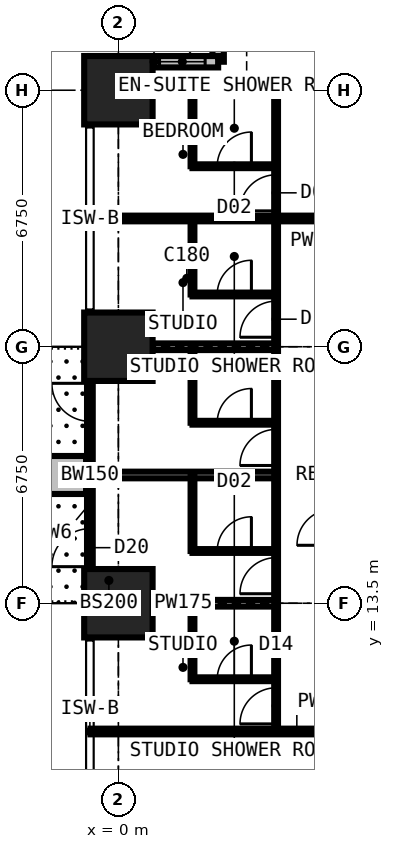
"""IFC4 building model, lengths in metres.
Left out: names, types, materials, properties, quantities, classifications, styles, units other than length and angle.
Written with IfcOpenShell. Run it as: python <this file> out.ifc"""

import sys

from ifc_helpers import new_model, si_unit, direction, frame, frame_2d, origin, origin_2d, place, context, subcontext, project, spatial, rectangle, extrude, element, fill, save


model = new_model("IFC4")
c1 = context("Model", 3, precision=1e-05, world=origin(), true_north=direction((0.0, 1.0)))
c2 = subcontext(c1, "Body", "Model", "MODEL_VIEW")
j1 = project(units=[si_unit("LENGTHUNIT", "METRE"), si_unit("PLANEANGLEUNIT", "RADIAN")], contexts=[c1])
p1 = place(None, origin())
s1 = spatial("IfcSite", under=j1, at=p1, CompositionType="ELEMENT")
p2 = place(p1, origin())
s2 = spatial("IfcBuilding", under=s1, at=p2, CompositionType="ELEMENT")
p3 = place(p2, frame((0.0, 0.0, 94.5)))
s3 = spatial("IfcBuildingStorey", under=s2, at=p3, CompositionType="ELEMENT", Elevation=94.5)
for number, where, z_axis, x_axis in (
    (1, (0.0, 13.5, 0.0), (0.0, 0.0, 1.0), (1.0, 0.0, 0.0)),
    (2, (0.0, 20.25, 0.0), (0.0, 0.0, 1.0), (1.0, 0.0, 0.0)),
    (3, (0.0, 27.0, 0.0), (0.0, 0.0, 1.0), (1.0, 0.0, 0.0)),
):
    element("IfcColumn", number, at=place(p3, frame(where, z_axis=z_axis, x_axis=x_axis)), inside=s3, PredefinedType="COLUMN", context=c2, shape_type="SweptSolid", body=[
        extrude(rectangle(XDim=1.8, YDim=1.8, at=origin_2d()), origin(), (0.0, 0.0, 1.0), 3.6),
    ])
p4 = place(p3, frame((2.625, 31.125, 0.0), z_axis=(0.0, 0.0, 1.0), x_axis=(0.0, -1.0, 0.0)))
e4 = element("IfcWall", 4, at=p4, inside=s3, PredefinedType="SOLIDWALL", context=c2, shape_type="SweptSolid", body=[
    extrude(rectangle(XDim=3.375, YDim=0.3, at=frame_2d((1.688, 0.0))), origin(), (0.0, 0.0, 1.0), 3.375),
])
p5 = place(p4, frame((0.788, 0.0, 0.6)))
e5 = element("IfcOpeningElement", 5, at=p5, cuts=e4, PredefinedType="OPENING", context=c2, shape_type="SweptSolid", body=[
    extrude(rectangle(XDim=1.8, YDim=2.1, at=frame_2d((0.9, 1.05))), frame((0.0, 0.16, 0.0), z_axis=(0.0, -1.0, 0.0), x_axis=(1.0, 0.0, 0.0)), (0.0, 0.0, 1.0), 0.32),
])
p6 = place(p3, frame((2.625, 27.75, 0.0), z_axis=(0.0, 0.0, 1.0), x_axis=(-1.0, 0.0, 0.0)))
e6 = element("IfcWall", 6, at=p6, inside=s3, PredefinedType="SOLIDWALL", context=c2, shape_type="SweptSolid", body=[
    extrude(rectangle(XDim=3.375, YDim=0.3, at=frame_2d((1.688, 0.0))), origin(), (0.0, 0.0, 1.0), 3.375),
])
p7 = place(p6, frame((0.343, 0.0, 0.9)))
e7 = element("IfcOpeningElement", 7, at=p7, cuts=e6, PredefinedType="OPENING", context=c2, shape_type="SweptSolid", body=[
    extrude(rectangle(XDim=1.2, YDim=1.8, at=frame_2d((0.6, 0.9))), frame((0.0, 0.16, 0.0), z_axis=(0.0, -1.0, 0.0), x_axis=(1.0, 0.0, 0.0)), (0.0, 0.0, 1.0), 0.32),
])
p8 = place(p3, frame((-0.75, 13.5, 0.0), z_axis=(0.0, 0.0, 1.0), x_axis=(0.0, 1.0, 0.0)))
e8 = element("IfcWall", 8, at=p8, inside=s3, PredefinedType="SOLIDWALL", context=c2, shape_type="SweptSolid", body=[
    extrude(rectangle(XDim=6.75, YDim=0.15, at=frame_2d((3.375, 0.0))), origin(), (0.0, 0.0, 1.0), 3.375),
])
p9 = place(p8, frame((0.962, 0.0, 0.0)))
e9 = element("IfcOpeningElement", 9, at=p9, cuts=e8, PredefinedType="OPENING", context=c2, shape_type="SweptSolid", body=[
    extrude(rectangle(XDim=1.0, YDim=2.2, at=frame_2d((0.5, 1.1))), frame((0.0, 0.085, 0.0), z_axis=(0.0, -1.0, 0.0), x_axis=(1.0, 0.0, 0.0)), (0.0, 0.0, 1.0), 0.17),
])
p10 = place(p8, frame((2.025, 0.0, 0.9)))
e10 = element("IfcOpeningElement", 10, at=p10, cuts=e8, PredefinedType="OPENING", context=c2, shape_type="SweptSolid", body=[
    extrude(rectangle(XDim=1.2, YDim=1.8, at=frame_2d((0.6, 0.9))), frame((0.0, 0.085, 0.0), z_axis=(0.0, -1.0, 0.0), x_axis=(1.0, 0.0, 0.0)), (0.0, 0.0, 1.0), 0.17),
])
p11 = place(p8, frame((4.788, 0.0, 0.0)))
e11 = element("IfcOpeningElement", 11, at=p11, cuts=e8, PredefinedType="OPENING", context=c2, shape_type="SweptSolid", body=[
    extrude(rectangle(XDim=1.0, YDim=2.2, at=frame_2d((0.5, 1.1))), frame((0.0, 0.085, 0.0), z_axis=(0.0, -1.0, 0.0), x_axis=(1.0, 0.0, 0.0)), (0.0, 0.0, 1.0), 0.17),
])
p12 = place(p8, frame((3.525, 0.0, 0.9)))
e12 = element("IfcOpeningElement", 12, at=p12, cuts=e8, PredefinedType="OPENING", context=c2, shape_type="SweptSolid", body=[
    extrude(rectangle(XDim=1.2, YDim=1.8, at=frame_2d((0.6, 0.9))), frame((0.0, 0.085, 0.0), z_axis=(0.0, -1.0, 0.0), x_axis=(1.0, 0.0, 0.0)), (0.0, 0.0, 1.0), 0.17),
])
p13 = place(p3, frame((-0.85, 16.875, 0.0), z_axis=(0.0, 0.0, 1.0), x_axis=(-1.0, 0.0, 0.0)))
e13 = element("IfcWall", 13, at=p13, inside=s3, PredefinedType="USERDEFINED", context=c2, shape_type="SweptSolid", body=[
    extrude(rectangle(XDim=2.2, YDim=1.0, at=frame_2d((1.1, 0.0))), origin(), (0.0, 0.0, 1.0), 0.9),
])
p14 = place(p3, frame((-0.734, 10.125, 0.0), z_axis=(0.0, 0.0, 1.0), x_axis=(1.0, 0.0, 0.0)))
e14 = element("IfcWall", 14, at=p14, inside=s3, PredefinedType="PARTITIONING", context=c2, shape_type="SweptSolid", body=[
    extrude(rectangle(XDim=10.859, YDim=0.15, at=frame_2d((5.429, 0.0))), origin(), (0.0, 0.0, 1.0), 3.375),
])
p15 = place(p3, frame((-0.734, 13.5, 0.0), z_axis=(0.0, 0.0, 1.0), x_axis=(1.0, 0.0, 0.0)))
e15 = element("IfcWall", 15, at=p15, inside=s3, PredefinedType="PARTITIONING", context=c2, shape_type="SweptSolid", body=[
    extrude(rectangle(XDim=4.884, YDim=0.175, at=frame_2d((2.442, 0.0))), origin(), (0.0, 0.0, 1.0), 2.877),
])
p16 = place(p3, frame((-0.734, 16.875, 0.0), z_axis=(0.0, 0.0, 1.0), x_axis=(1.0, 0.0, 0.0)))
e16 = element("IfcWall", 16, at=p16, inside=s3, PredefinedType="PARTITIONING", context=c2, shape_type="SweptSolid", body=[
    extrude(rectangle(XDim=4.884, YDim=0.175, at=frame_2d((2.442, 0.0))), origin(), (0.0, 0.0, 1.0), 3.375),
])
p17 = place(p3, frame((-0.734, 20.25, 0.0), z_axis=(0.0, 0.0, 1.0), x_axis=(1.0, 0.0, 0.0)))
e17 = element("IfcWall", 17, at=p17, inside=s3, PredefinedType="PARTITIONING", context=c2, shape_type="SweptSolid", body=[
    extrude(rectangle(XDim=4.884, YDim=0.175, at=frame_2d((2.442, 0.0))), origin(), (0.0, 0.0, 1.0), 2.877),
])
p18 = place(p3, frame((-0.734, 23.625, 0.0), z_axis=(0.0, 0.0, 1.0), x_axis=(1.0, 0.0, 0.0)))
e18 = element("IfcWall", 18, at=p18, inside=s3, PredefinedType="PARTITIONING", context=c2, shape_type="SweptSolid", body=[
    extrude(rectangle(XDim=12.034, YDim=0.15, at=frame_2d((6.017, 0.0))), origin(), (0.0, 0.0, 1.0), 3.375),
])
p19 = place(p3, frame((-0.734, 27.0, 0.0), z_axis=(0.0, 0.0, 1.0), x_axis=(1.0, 0.0, 0.0)))
e19 = element("IfcWall", 19, at=p19, inside=s3, PredefinedType="PARTITIONING", context=c2, shape_type="SweptSolid", body=[
    extrude(rectangle(XDim=12.034, YDim=0.15, at=frame_2d((6.017, 0.0))), origin(), (0.0, 0.0, 1.0), 2.806),
])
p20 = place(p19, frame((8.434, 0.0, 0.0)))
e20 = element("IfcOpeningElement", 20, at=p20, cuts=e19, PredefinedType="OPENING", context=c2, shape_type="SweptSolid", body=[
    extrude(rectangle(XDim=1.0, YDim=2.2, at=frame_2d((0.5, 1.1))), frame((0.0, 0.085, 0.0), z_axis=(0.0, -1.0, 0.0), x_axis=(1.0, 0.0, 0.0)), (0.0, 0.0, 1.0), 0.17),
])
p21 = place(p3, frame((1.95, 11.5, 0.0), z_axis=(0.0, 0.0, 1.0), x_axis=(0.0, 1.0, 0.0)))
e21 = element("IfcWall", 21, at=p21, inside=s3, PredefinedType="PARTITIONING", context=c2, shape_type="SweptSolid", body=[
    extrude(rectangle(XDim=2.0, YDim=0.1, at=frame_2d((1.0, 0.0))), origin(), (0.0, 0.0, 1.0), 3.375),
])
p22 = place(p3, frame((1.95, 11.5, 0.0), z_axis=(0.0, 0.0, 1.0), x_axis=(1.0, 0.0, 0.0)))
e22 = element("IfcWall", 22, at=p22, inside=s3, PredefinedType="PARTITIONING", context=c2, shape_type="SweptSolid", body=[
    extrude(rectangle(XDim=2.2, YDim=0.1, at=frame_2d((1.1, 0.0))), origin(), (0.0, 0.0, 1.0), 3.375),
])
p23 = place(p22, frame((0.65, 0.0, 0.0)))
e23 = element("IfcOpeningElement", 23, at=p23, cuts=e22, PredefinedType="OPENING", context=c2, shape_type="SweptSolid", body=[
    extrude(rectangle(XDim=0.9, YDim=2.2, at=frame_2d((0.45, 1.1))), frame((0.0, 0.06, 0.0), z_axis=(0.0, -1.0, 0.0), x_axis=(1.0, 0.0, 0.0)), (0.0, 0.0, 1.0), 0.12),
])
p24 = place(p3, frame((1.95, 14.875, 0.0), z_axis=(0.0, 0.0, 1.0), x_axis=(0.0, 1.0, 0.0)))
e24 = element("IfcWall", 24, at=p24, inside=s3, PredefinedType="PARTITIONING", context=c2, shape_type="SweptSolid", body=[
    extrude(rectangle(XDim=2.0, YDim=0.1, at=frame_2d((1.0, 0.0))), origin(), (0.0, 0.0, 1.0), 3.375),
])
p25 = place(p3, frame((1.95, 14.875, 0.0), z_axis=(0.0, 0.0, 1.0), x_axis=(1.0, 0.0, 0.0)))
e25 = element("IfcWall", 25, at=p25, inside=s3, PredefinedType="PARTITIONING", context=c2, shape_type="SweptSolid", body=[
    extrude(rectangle(XDim=2.2, YDim=0.1, at=frame_2d((1.1, 0.0))), origin(), (0.0, 0.0, 1.0), 3.375),
])
p26 = place(p25, frame((0.65, 0.0, 0.0)))
e26 = element("IfcOpeningElement", 26, at=p26, cuts=e25, PredefinedType="OPENING", context=c2, shape_type="SweptSolid", body=[
    extrude(rectangle(XDim=0.9, YDim=2.2, at=frame_2d((0.45, 1.1))), frame((0.0, 0.06, 0.0), z_axis=(0.0, -1.0, 0.0), x_axis=(1.0, 0.0, 0.0)), (0.0, 0.0, 1.0), 0.12),
])
p27 = place(p3, frame((1.95, 18.25, 0.0), z_axis=(0.0, 0.0, 1.0), x_axis=(0.0, 1.0, 0.0)))
e27 = element("IfcWall", 27, at=p27, inside=s3, PredefinedType="PARTITIONING", context=c2, shape_type="SweptSolid", body=[
    extrude(rectangle(XDim=2.0, YDim=0.1, at=frame_2d((1.0, 0.0))), origin(), (0.0, 0.0, 1.0), 3.375),
])
p28 = place(p3, frame((1.95, 18.25, 0.0), z_axis=(0.0, 0.0, 1.0), x_axis=(1.0, 0.0, 0.0)))
e28 = element("IfcWall", 28, at=p28, inside=s3, PredefinedType="PARTITIONING", context=c2, shape_type="SweptSolid", body=[
    extrude(rectangle(XDim=2.2, YDim=0.1, at=frame_2d((1.1, 0.0))), origin(), (0.0, 0.0, 1.0), 3.375),
])
p29 = place(p28, frame((0.65, 0.0, 0.0)))
e29 = element("IfcOpeningElement", 29, at=p29, cuts=e28, PredefinedType="OPENING", context=c2, shape_type="SweptSolid", body=[
    extrude(rectangle(XDim=0.9, YDim=2.2, at=frame_2d((0.45, 1.1))), frame((0.0, 0.06, 0.0), z_axis=(0.0, -1.0, 0.0), x_axis=(1.0, 0.0, 0.0)), (0.0, 0.0, 1.0), 0.12),
])
p30 = place(p3, frame((1.95, 21.625, 0.0), z_axis=(0.0, 0.0, 1.0), x_axis=(0.0, 1.0, 0.0)))
e30 = element("IfcWall", 30, at=p30, inside=s3, PredefinedType="PARTITIONING", context=c2, shape_type="SweptSolid", body=[
    extrude(rectangle(XDim=2.0, YDim=0.1, at=frame_2d((1.0, 0.0))), origin(), (0.0, 0.0, 1.0), 3.375),
])
p31 = place(p3, frame((1.95, 21.625, 0.0), z_axis=(0.0, 0.0, 1.0), x_axis=(1.0, 0.0, 0.0)))
e31 = element("IfcWall", 31, at=p31, inside=s3, PredefinedType="PARTITIONING", context=c2, shape_type="SweptSolid", body=[
    extrude(rectangle(XDim=2.2, YDim=0.1, at=frame_2d((1.1, 0.0))), origin(), (0.0, 0.0, 1.0), 3.375),
])
p32 = place(p31, frame((0.65, 0.0, 0.0)))
e32 = element("IfcOpeningElement", 32, at=p32, cuts=e31, PredefinedType="OPENING", context=c2, shape_type="SweptSolid", body=[
    extrude(rectangle(XDim=0.9, YDim=2.2, at=frame_2d((0.45, 1.1))), frame((0.0, 0.06, 0.0), z_axis=(0.0, -1.0, 0.0), x_axis=(1.0, 0.0, 0.0)), (0.0, 0.0, 1.0), 0.12),
])
p33 = place(p3, frame((1.95, 25.0, 0.0), z_axis=(0.0, 0.0, 1.0), x_axis=(0.0, 1.0, 0.0)))
e33 = element("IfcWall", 33, at=p33, inside=s3, PredefinedType="PARTITIONING", context=c2, shape_type="SweptSolid", body=[
    extrude(rectangle(XDim=2.0, YDim=0.1, at=frame_2d((1.0, 0.0))), origin(), (0.0, 0.0, 1.0), 3.375),
])
p34 = place(p3, frame((1.95, 25.0, 0.0), z_axis=(0.0, 0.0, 1.0), x_axis=(1.0, 0.0, 0.0)))
e34 = element("IfcWall", 34, at=p34, inside=s3, PredefinedType="PARTITIONING", context=c2, shape_type="SweptSolid", body=[
    extrude(rectangle(XDim=2.2, YDim=0.1, at=frame_2d((1.1, 0.0))), origin(), (0.0, 0.0, 1.0), 3.375),
])
p35 = place(p34, frame((0.65, 0.0, 0.0)))
e35 = element("IfcOpeningElement", 35, at=p35, cuts=e34, PredefinedType="OPENING", context=c2, shape_type="SweptSolid", body=[
    extrude(rectangle(XDim=0.9, YDim=2.2, at=frame_2d((0.45, 1.1))), frame((0.0, 0.06, 0.0), z_axis=(0.0, -1.0, 0.0), x_axis=(1.0, 0.0, 0.0)), (0.0, 0.0, 1.0), 0.12),
])
p36 = place(p3, frame((4.15, 10.125, 0.0), z_axis=(0.0, 0.0, 1.0), x_axis=(0.0, 1.0, 0.0)))
e36 = element("IfcWall", 36, at=p36, inside=s3, PredefinedType="PARTITIONING", context=c2, shape_type="SweptSolid", body=[
    extrude(rectangle(XDim=16.875, YDim=0.1, at=frame_2d((8.438, 0.0))), origin(), (0.0, 0.0, 1.0), 3.375),
])
p37 = place(p36, frame((13.7, 0.0, 0.0)))
e37 = element("IfcOpeningElement", 37, at=p37, cuts=e36, PredefinedType="OPENING", context=c2, shape_type="SweptSolid", body=[
    extrude(rectangle(XDim=0.95, YDim=2.2, at=frame_2d((0.475, 1.1))), frame((0.0, 0.06, 0.0), z_axis=(0.0, -1.0, 0.0), x_axis=(1.0, 0.0, 0.0)), (0.0, 0.0, 1.0), 0.12),
])
p38 = place(p36, frame((0.2, 0.0, 0.0)))
e38 = element("IfcOpeningElement", 38, at=p38, cuts=e36, PredefinedType="OPENING", context=c2, shape_type="SweptSolid", body=[
    extrude(rectangle(XDim=0.95, YDim=2.2, at=frame_2d((0.475, 1.1))), frame((0.0, 0.06, 0.0), z_axis=(0.0, -1.0, 0.0), x_axis=(1.0, 0.0, 0.0)), (0.0, 0.0, 1.0), 0.12),
])
p39 = place(p36, frame((3.625, 0.0, 0.0)))
e39 = element("IfcOpeningElement", 39, at=p39, cuts=e36, PredefinedType="OPENING", context=c2, shape_type="SweptSolid", body=[
    extrude(rectangle(XDim=0.95, YDim=2.2, at=frame_2d((0.475, 1.1))), frame((0.0, 0.06, 0.0), z_axis=(0.0, -1.0, 0.0), x_axis=(1.0, 0.0, 0.0)), (0.0, 0.0, 1.0), 0.12),
])
p40 = place(p36, frame((7.0, 0.0, 0.0)))
e40 = element("IfcOpeningElement", 40, at=p40, cuts=e36, PredefinedType="OPENING", context=c2, shape_type="SweptSolid", body=[
    extrude(rectangle(XDim=0.95, YDim=2.2, at=frame_2d((0.475, 1.1))), frame((0.0, 0.06, 0.0), z_axis=(0.0, -1.0, 0.0), x_axis=(1.0, 0.0, 0.0)), (0.0, 0.0, 1.0), 0.12),
])
p41 = place(p36, frame((10.375, 0.0, 0.0)))
e41 = element("IfcOpeningElement", 41, at=p41, cuts=e36, PredefinedType="OPENING", context=c2, shape_type="SweptSolid", body=[
    extrude(rectangle(XDim=0.95, YDim=2.2, at=frame_2d((0.475, 1.1))), frame((0.0, 0.06, 0.0), z_axis=(0.0, -1.0, 0.0), x_axis=(1.0, 0.0, 0.0)), (0.0, 0.0, 1.0), 0.12),
])
p42 = place(p7, origin())
e42 = element("IfcWindow", 42, at=p42, inside=s3, PartitioningType="SINGLE_PANEL", PredefinedType="WINDOW", context=c2, shape_type="SweptSolid", body=[
    extrude(rectangle(XDim=1.2, YDim=1.8, at=frame_2d((0.6, 0.9))), frame((0.0, 0.03, 0.0), z_axis=(0.0, -1.0, 0.0), x_axis=(1.0, 0.0, 0.0)), (0.0, 0.0, 1.0), 0.06),
])
fill(e7, e42)
p43 = place(p9, origin())
e43 = element("IfcDoor", 43, at=p43, inside=s3, OperationType="SINGLE_SWING_LEFT", PredefinedType="DOOR", context=c2, shape_type="SweptSolid", body=[
    extrude(rectangle(XDim=1.0, YDim=2.2, at=frame_2d((0.5, 1.1))), frame((0.0, 0.025, 0.0), z_axis=(0.0, -1.0, 0.0), x_axis=(1.0, 0.0, 0.0)), (0.0, 0.0, 1.0), 0.05),
])
fill(e9, e43)
p44 = place(p10, origin())
e44 = element("IfcWindow", 44, at=p44, inside=s3, PartitioningType="SINGLE_PANEL", PredefinedType="WINDOW", context=c2, shape_type="SweptSolid", body=[
    extrude(rectangle(XDim=1.2, YDim=1.8, at=frame_2d((0.6, 0.9))), frame((0.0, 0.03, 0.0), z_axis=(0.0, -1.0, 0.0), x_axis=(1.0, 0.0, 0.0)), (0.0, 0.0, 1.0), 0.06),
])
fill(e10, e44)
p45 = place(p11, origin())
e45 = element("IfcDoor", 45, at=p45, inside=s3, OperationType="SINGLE_SWING_RIGHT", PredefinedType="DOOR", context=c2, shape_type="SweptSolid", body=[
    extrude(rectangle(XDim=1.0, YDim=2.2, at=frame_2d((0.5, 1.1))), frame((0.0, 0.025, 0.0), z_axis=(0.0, -1.0, 0.0), x_axis=(1.0, 0.0, 0.0)), (0.0, 0.0, 1.0), 0.05),
])
fill(e11, e45)
p46 = place(p12, origin())
e46 = element("IfcWindow", 46, at=p46, inside=s3, PartitioningType="SINGLE_PANEL", PredefinedType="WINDOW", context=c2, shape_type="SweptSolid", body=[
    extrude(rectangle(XDim=1.2, YDim=1.8, at=frame_2d((0.6, 0.9))), frame((0.0, 0.03, 0.0), z_axis=(0.0, -1.0, 0.0), x_axis=(1.0, 0.0, 0.0)), (0.0, 0.0, 1.0), 0.06),
])
fill(e12, e46)
p47 = place(p37, origin())
e47 = element("IfcDoor", 47, at=p47, inside=s3, OperationType="SINGLE_SWING_LEFT", PredefinedType="DOOR", context=c2, shape_type="SweptSolid", body=[
    extrude(rectangle(XDim=0.95, YDim=2.2, at=frame_2d((0.475, 1.1))), frame((0.0, 0.025, 0.0), z_axis=(0.0, -1.0, 0.0), x_axis=(1.0, 0.0, 0.0)), (0.0, 0.0, 1.0), 0.05),
])
fill(e37, e47)
p48 = place(p35, origin())
e48 = element("IfcDoor", 48, at=p48, inside=s3, OperationType="SINGLE_SWING_RIGHT", PredefinedType="DOOR", context=c2, shape_type="SweptSolid", body=[
    extrude(rectangle(XDim=0.9, YDim=2.2, at=frame_2d((0.45, 1.1))), frame((0.0, 0.025, 0.0), z_axis=(0.0, -1.0, 0.0), x_axis=(1.0, 0.0, 0.0)), (0.0, 0.0, 1.0), 0.05),
])
fill(e35, e48)
p49 = place(p38, origin())
e49 = element("IfcDoor", 49, at=p49, inside=s3, OperationType="SINGLE_SWING_LEFT", PredefinedType="DOOR", context=c2, shape_type="SweptSolid", body=[
    extrude(rectangle(XDim=0.95, YDim=2.2, at=frame_2d((0.475, 1.1))), frame((0.0, 0.025, 0.0), z_axis=(0.0, -1.0, 0.0), x_axis=(1.0, 0.0, 0.0)), (0.0, 0.0, 1.0), 0.05),
])
fill(e38, e49)
p50 = place(p23, origin())
e50 = element("IfcDoor", 50, at=p50, inside=s3, OperationType="SINGLE_SWING_RIGHT", PredefinedType="DOOR", context=c2, shape_type="SweptSolid", body=[
    extrude(rectangle(XDim=0.9, YDim=2.2, at=frame_2d((0.45, 1.1))), frame((0.0, 0.025, 0.0), z_axis=(0.0, -1.0, 0.0), x_axis=(1.0, 0.0, 0.0)), (0.0, 0.0, 1.0), 0.05),
])
fill(e23, e50)
p51 = place(p39, origin())
e51 = element("IfcDoor", 51, at=p51, inside=s3, OperationType="SINGLE_SWING_LEFT", PredefinedType="DOOR", context=c2, shape_type="SweptSolid", body=[
    extrude(rectangle(XDim=0.95, YDim=2.2, at=frame_2d((0.475, 1.1))), frame((0.0, 0.025, 0.0), z_axis=(0.0, -1.0, 0.0), x_axis=(1.0, 0.0, 0.0)), (0.0, 0.0, 1.0), 0.05),
])
fill(e39, e51)
p52 = place(p26, origin())
e52 = element("IfcDoor", 52, at=p52, inside=s3, OperationType="SINGLE_SWING_RIGHT", PredefinedType="DOOR", context=c2, shape_type="SweptSolid", body=[
    extrude(rectangle(XDim=0.9, YDim=2.2, at=frame_2d((0.45, 1.1))), frame((0.0, 0.025, 0.0), z_axis=(0.0, -1.0, 0.0), x_axis=(1.0, 0.0, 0.0)), (0.0, 0.0, 1.0), 0.05),
])
fill(e26, e52)
p53 = place(p40, origin())
e53 = element("IfcDoor", 53, at=p53, inside=s3, OperationType="SINGLE_SWING_LEFT", PredefinedType="DOOR", context=c2, shape_type="SweptSolid", body=[
    extrude(rectangle(XDim=0.95, YDim=2.2, at=frame_2d((0.475, 1.1))), frame((0.0, 0.025, 0.0), z_axis=(0.0, -1.0, 0.0), x_axis=(1.0, 0.0, 0.0)), (0.0, 0.0, 1.0), 0.05),
])
fill(e40, e53)
p54 = place(p29, origin())
e54 = element("IfcDoor", 54, at=p54, inside=s3, OperationType="SINGLE_SWING_RIGHT", PredefinedType="DOOR", context=c2, shape_type="SweptSolid", body=[
    extrude(rectangle(XDim=0.9, YDim=2.2, at=frame_2d((0.45, 1.1))), frame((0.0, 0.025, 0.0), z_axis=(0.0, -1.0, 0.0), x_axis=(1.0, 0.0, 0.0)), (0.0, 0.0, 1.0), 0.05),
])
fill(e29, e54)
p55 = place(p41, origin())
e55 = element("IfcDoor", 55, at=p55, inside=s3, OperationType="SINGLE_SWING_LEFT", PredefinedType="DOOR", context=c2, shape_type="SweptSolid", body=[
    extrude(rectangle(XDim=0.95, YDim=2.2, at=frame_2d((0.475, 1.1))), frame((0.0, 0.025, 0.0), z_axis=(0.0, -1.0, 0.0), x_axis=(1.0, 0.0, 0.0)), (0.0, 0.0, 1.0), 0.05),
])
fill(e41, e55)
p56 = place(p32, origin())
e56 = element("IfcDoor", 56, at=p56, inside=s3, OperationType="SINGLE_SWING_RIGHT", PredefinedType="DOOR", context=c2, shape_type="SweptSolid", body=[
    extrude(rectangle(XDim=0.9, YDim=2.2, at=frame_2d((0.45, 1.1))), frame((0.0, 0.025, 0.0), z_axis=(0.0, -1.0, 0.0), x_axis=(1.0, 0.0, 0.0)), (0.0, 0.0, 1.0), 0.05),
])
fill(e32, e56)
save(model, sys.argv[1])
